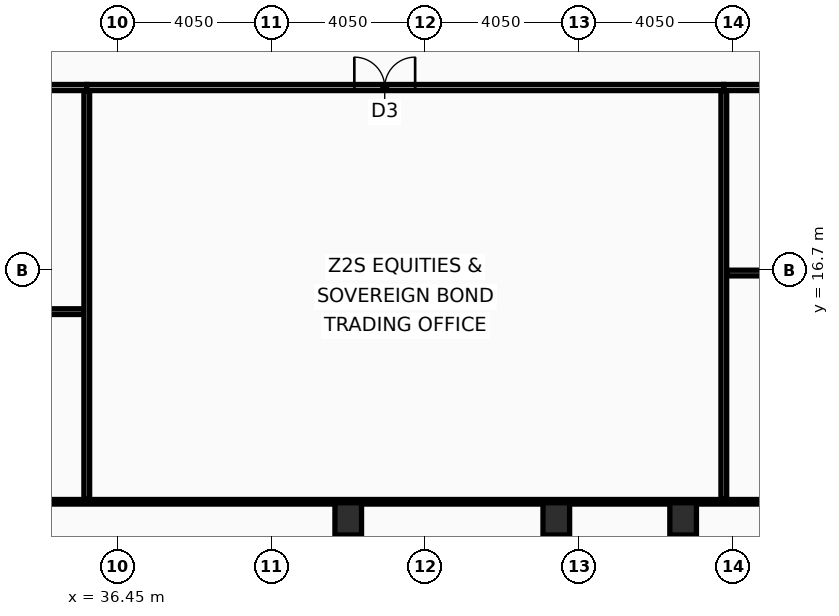
"""IFC4 building model, lengths in metres.
Left out: names, types, materials, properties, quantities, classifications, styles, units other than length and angle.
Written with IfcOpenShell. Run it as: python <this file> out.ifc"""

import sys

from ifc_helpers import new_model, si_unit, direction, frame, frame_2d, origin, origin_2d, place, context, subcontext, project, spatial, rectangle, hollow_rectangle, extrude, element, fill, save


model = new_model("IFC4")
c1 = context("Model", 3, precision=1e-05, world=origin(), true_north=direction((0.0, 1.0)))
c2 = subcontext(c1, "Body", "Model", "MODEL_VIEW")
j1 = project(units=[si_unit("LENGTHUNIT", "METRE"), si_unit("PLANEANGLEUNIT", "RADIAN")], contexts=[c1])
p1 = place(None, origin())
s1 = spatial("IfcSite", under=j1, at=p1, CompositionType="ELEMENT")
p2 = place(p1, origin())
s2 = spatial("IfcBuilding", under=s1, at=p2, CompositionType="ELEMENT")
p3 = place(p2, frame((0.0, 0.0, 125.4)))
s3 = spatial("IfcBuildingStorey", under=s2, at=p3, CompositionType="ELEMENT", Elevation=125.4)
for number, where, z_axis, x_axis in (
    (1, (42.525, 10.15, 0.0), (0.0, 0.0, 1.0), (1.0, 0.0, 0.0)),
    (2, (48.0, 10.15, 0.0), (0.0, 0.0, 1.0), (1.0, 0.0, 0.0)),
    (3, (51.337, 10.15, 0.0), (0.0, 0.0, 1.0), (1.0, 0.0, 0.0)),
):
    element("IfcColumn", number, at=place(p3, frame(where, z_axis=z_axis, x_axis=x_axis)), inside=s3, PredefinedType="COLUMN", context=c2, shape_type="SweptSolid", body=[
        extrude(hollow_rectangle(XDim=0.7, YDim=0.85, WallThickness=0.05, at=origin_2d()), origin(), (0.0, 0.0, 1.0), 3.6),
    ])
p4 = place(p3, frame((23.701, 21.5, 0.0), z_axis=(0.0, 0.0, 1.0), x_axis=(1.0, 0.0, 0.0)))
e4 = element("IfcWall", 4, at=p4, inside=s3, PredefinedType="PARTITIONING", context=c2, shape_type="SweptSolid", body=[
    extrude(rectangle(XDim=11.944, YDim=0.16, at=frame_2d((5.972, 0.0))), origin(), (0.0, 0.0, 1.0), 2.73),
])
p5 = place(p4, frame((5.016, 0.0, 0.0)))
e5 = element("IfcOpeningElement", 5, at=p5, cuts=e4, PredefinedType="OPENING", context=c2, shape_type="SweptSolid", body=[
    extrude(rectangle(XDim=1.0, YDim=2.05, at=frame_2d((0.5, 1.025))), frame((0.0, 0.09, 0.0), z_axis=(0.0, -1.0, 0.0), x_axis=(1.0, 0.0, 0.0)), (0.0, 0.0, 1.0), 0.18),
])
p6 = place(p3, frame((23.781, 15.603, 0.0), z_axis=(0.0, 0.0, 1.0), x_axis=(1.0, 0.0, 0.0)))
e6 = element("IfcWall", 6, at=p6, inside=s3, PredefinedType="PARTITIONING", context=c2, shape_type="SweptSolid", body=[
    extrude(rectangle(XDim=11.784, YDim=0.15, at=frame_2d((5.892, 0.0))), origin(), (0.0, 0.0, 1.0), 2.73),
])
p7 = place(p6, frame((5.375, 0.0, 0.0)))
e7 = element("IfcOpeningElement", 7, at=p7, cuts=e6, PredefinedType="OPENING", context=c2, shape_type="SweptSolid", body=[
    extrude(rectangle(XDim=0.9, YDim=2.05, at=frame_2d((0.45, 1.025))), frame((0.0, 0.085, 0.0), z_axis=(0.0, -1.0, 0.0), x_axis=(1.0, 0.0, 0.0)), (0.0, 0.0, 1.0), 0.17),
])
p8 = place(p3, frame((35.645, 21.5, 0.0), z_axis=(0.0, 0.0, 1.0), x_axis=(1.0, 0.0, 0.0)))
e8 = element("IfcWall", 8, at=p8, inside=s3, PredefinedType="PARTITIONING", context=c2, shape_type="SweptSolid", body=[
    extrude(rectangle(XDim=16.763, YDim=0.16, at=frame_2d((8.382, 0.0))), origin(), (0.0, 0.0, 1.0), 2.73),
])
p9 = place(p8, frame((7.041, 0.0, 0.0)))
e9 = element("IfcOpeningElement", 9, at=p9, cuts=e8, PredefinedType="OPENING", context=c2, shape_type="SweptSolid", body=[
    extrude(rectangle(XDim=1.6, YDim=2.15, at=frame_2d((0.8, 1.075))), frame((0.0, 0.09, 0.0), z_axis=(0.0, -1.0, 0.0), x_axis=(1.0, 0.0, 0.0)), (0.0, 0.0, 1.0), 0.18),
])
p10 = place(p3, frame((35.645, 10.665, 0.0), z_axis=(0.0, 0.0, 1.0), x_axis=(0.0, 1.0, 0.0)))
e10 = element("IfcWall", 10, at=p10, inside=s3, PredefinedType="PARTITIONING", context=c2, shape_type="SweptSolid", body=[
    extrude(rectangle(XDim=10.75, YDim=0.15, at=frame_2d((5.375, 0.0))), origin(), (0.0, 0.0, 1.0), 2.88),
])
p11 = place(p3, frame((52.408, 21.5, 0.0), z_axis=(0.0, 0.0, 1.0), x_axis=(1.0, 0.0, 0.0)))
e11 = element("IfcWall", 11, at=p11, inside=s3, PredefinedType="PARTITIONING", context=c2, shape_type="SweptSolid", body=[
    extrude(rectangle(XDim=8.015, YDim=0.16, at=frame_2d((4.007, 0.0))), origin(), (0.0, 0.0, 1.0), 2.73),
])
p12 = place(p11, frame((3.366, 0.0, 0.0)))
e12 = element("IfcOpeningElement", 12, at=p12, cuts=e11, PredefinedType="OPENING", context=c2, shape_type="SweptSolid", body=[
    extrude(rectangle(XDim=1.0, YDim=2.05, at=frame_2d((0.5, 1.025))), frame((0.0, 0.09, 0.0), z_axis=(0.0, -1.0, 0.0), x_axis=(1.0, 0.0, 0.0)), (0.0, 0.0, 1.0), 0.18),
])
p13 = place(p3, frame((52.408, 10.665, 0.0), z_axis=(0.0, 0.0, 1.0), x_axis=(0.0, 1.0, 0.0)))
e13 = element("IfcWall", 13, at=p13, inside=s3, PredefinedType="PARTITIONING", context=c2, shape_type="SweptSolid", body=[
    extrude(rectangle(XDim=10.75, YDim=0.15, at=frame_2d((5.375, 0.0))), origin(), (0.0, 0.0, 1.0), 2.88),
])
p14 = place(p3, frame((52.488, 16.619, 0.0), z_axis=(0.0, 0.0, 1.0), x_axis=(1.0, 0.0, 0.0)))
e14 = element("IfcWall", 14, at=p14, inside=s3, PredefinedType="PARTITIONING", context=c2, shape_type="SweptSolid", body=[
    extrude(rectangle(XDim=7.855, YDim=0.15, at=frame_2d((3.928, 0.0))), origin(), (0.0, 0.0, 1.0), 2.73),
])
p15 = place(p14, frame((3.607, 0.0, 0.0)))
e15 = element("IfcOpeningElement", 15, at=p15, cuts=e14, PredefinedType="OPENING", context=c2, shape_type="SweptSolid", body=[
    extrude(rectangle(XDim=0.9, YDim=2.05, at=frame_2d((0.45, 1.025))), frame((0.0, 0.085, 0.0), z_axis=(0.0, -1.0, 0.0), x_axis=(1.0, 0.0, 0.0)), (0.0, 0.0, 1.0), 0.17),
])
p16 = place(p3, frame((4.095, 10.6, 0.0), z_axis=(0.0, 0.0, 1.0), x_axis=(1.0, 0.0, 0.0)))
e16 = element("IfcWall", 16, at=p16, inside=s3, PredefinedType="PARTITIONING", context=c2, shape_type="SweptSolid", body=[
    extrude(rectangle(XDim=64.71, YDim=0.12, at=frame_2d((32.355, 0.0))), origin(), (0.0, 0.0, 1.0), 2.73),
])
p17 = place(p9, origin())
e17 = element("IfcDoor", 17, at=p17, inside=s3, OperationType="DOUBLE_DOOR_SINGLE_SWING", PredefinedType="DOOR", context=c2, shape_type="SweptSolid", body=[
    extrude(rectangle(XDim=1.6, YDim=2.15, at=frame_2d((0.8, 1.075))), frame((0.0, 0.025, 0.0), z_axis=(0.0, -1.0, 0.0), x_axis=(1.0, 0.0, 0.0)), (0.0, 0.0, 1.0), 0.05),
])
fill(e9, e17)
save(model, sys.argv[1])
